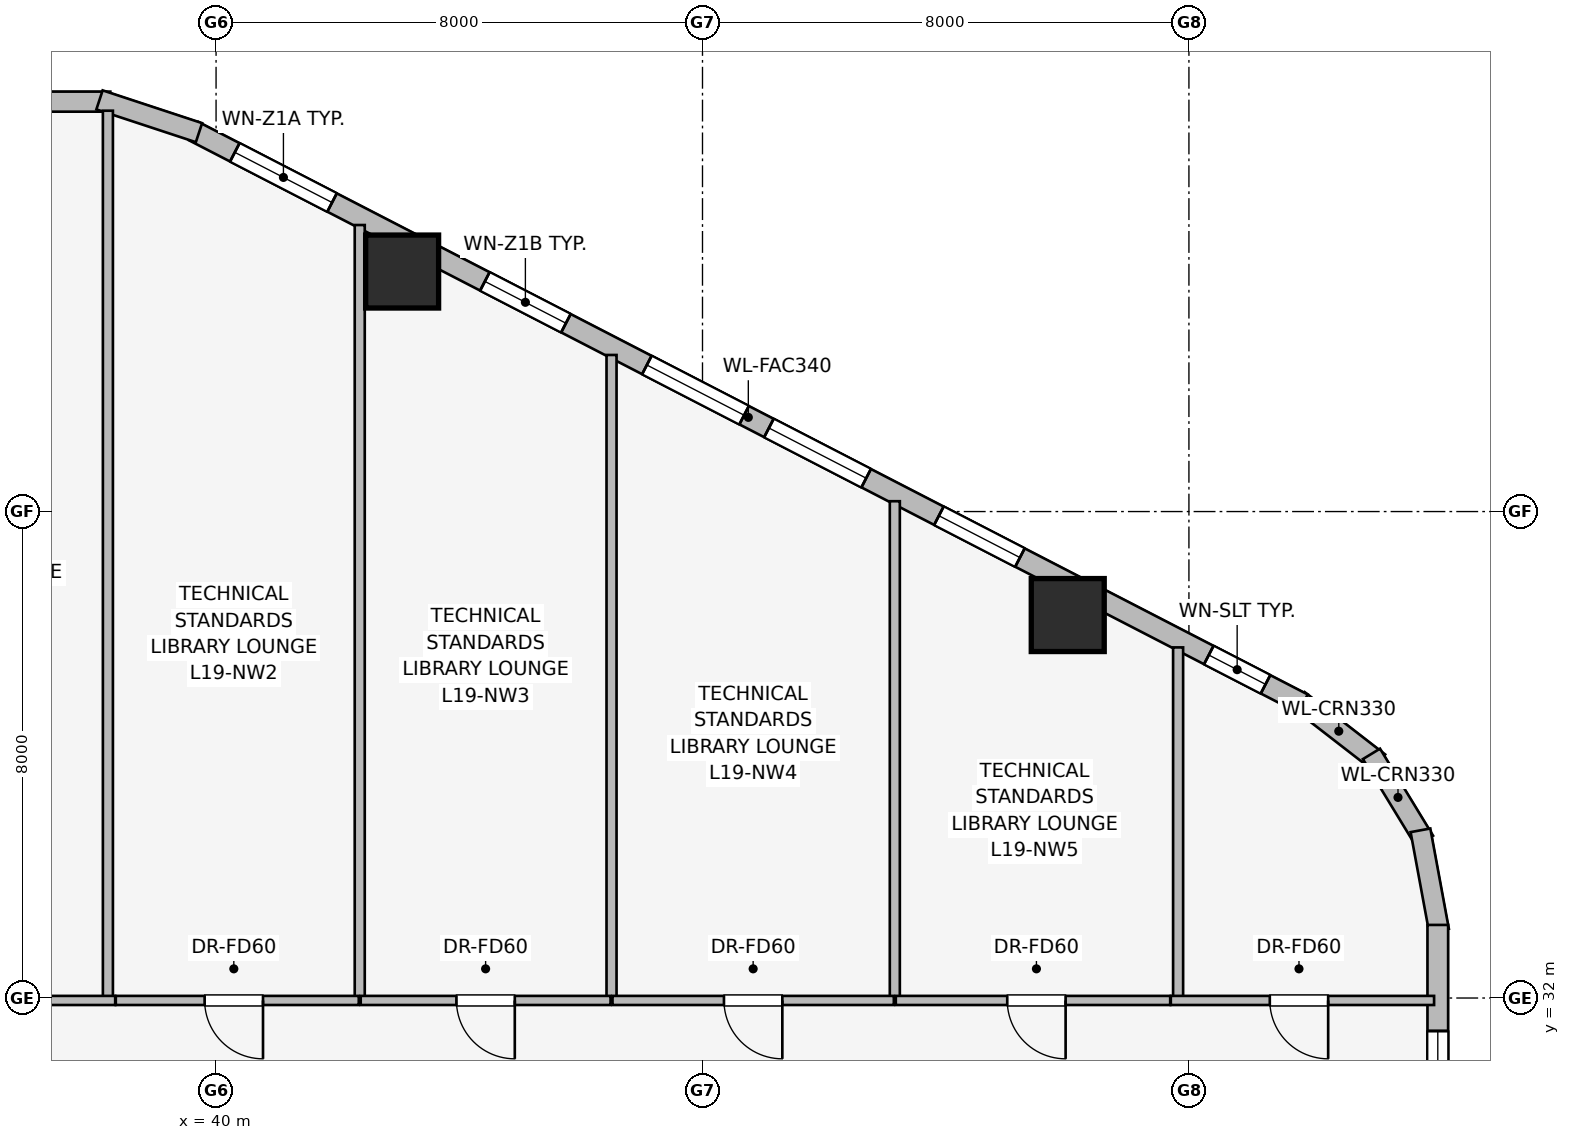
"""IFC4 building model, lengths in metres.
Left out: names, types, materials, properties, quantities, classifications, styles, units other than length and angle.
Written with IfcOpenShell. Run it as: python <this file> out.ifc"""

import sys

from ifc_helpers import new_model, si_unit, direction, frame, frame_2d, origin, origin_2d, place, context, subcontext, project, spatial, rectangle, extrude, element, fill, save


model = new_model("IFC4")
c1 = context("Model", 3, precision=1e-05, world=origin(), true_north=direction((0.0, 1.0)))
c2 = subcontext(c1, "Body", "Model", "MODEL_VIEW")
j1 = project(units=[si_unit("LENGTHUNIT", "METRE"), si_unit("PLANEANGLEUNIT", "RADIAN")], contexts=[c1])
p1 = place(None, origin())
s1 = spatial("IfcSite", under=j1, at=p1, CompositionType="ELEMENT")
p2 = place(p1, origin())
s2 = spatial("IfcBuilding", under=s1, at=p2, CompositionType="ELEMENT")
p3 = place(p2, frame((0.0, 0.0, 74.45)))
s3 = spatial("IfcBuildingStorey", under=s2, at=p3, CompositionType="ELEMENT", Elevation=74.45)
for number, where, z_axis, x_axis in (
    (1, (54.007, 38.298, 0.0), (0.0, 0.0, 1.0), (1.0, 0.0, 0.0)),
    (2, (43.06, 43.947, 0.0), (0.0, 0.0, 1.0), (1.0, 0.0, 0.0)),
):
    element("IfcColumn", number, at=place(p3, frame(where, z_axis=z_axis, x_axis=x_axis)), inside=s3, PredefinedType="COLUMN", context=c2, shape_type="SweptSolid", body=[
        extrude(rectangle(XDim=1.2, YDim=1.2, at=origin_2d()), origin(), (0.0, 0.0, 1.0), 3.65),
    ])
p4 = place(p3, frame((57.802, 36.901, 0.0), z_axis=(0.0, 0.0, 1.0), x_axis=(0.790691856293, -0.61221433207, 0.0)))
e3 = element("IfcWall", 3, at=p4, inside=s3, PredefinedType="STANDARD", context=c2, shape_type="SweptSolid", body=[
    extrude(rectangle(XDim=1.676, YDim=0.33, at=frame_2d((0.838, 0.0))), origin(), (0.0, 0.0, 1.0), 3.39),
])
p5 = place(p3, frame((59.002, 36.015, 0.0), z_axis=(0.0, 0.0, 1.0), x_axis=(0.520584129191, -0.853810379671, 0.0)))
e4 = element("IfcWall", 4, at=p5, inside=s3, PredefinedType="STANDARD", context=c2, shape_type="SweptSolid", body=[
    extrude(rectangle(XDim=1.677, YDim=0.33, at=frame_2d((0.838, 0.0))), origin(), (0.0, 0.0, 1.0), 3.39),
])
p6 = place(p3, frame((59.808, 34.758, 0.0), z_axis=(0.0, 0.0, 1.0), x_axis=(0.181714143354, -0.983351397063, 0.0)))
e5 = element("IfcWall", 5, at=p6, inside=s3, PredefinedType="STANDARD", context=c2, shape_type="SweptSolid", body=[
    extrude(rectangle(XDim=1.678, YDim=0.33, at=frame_2d((0.839, 0.0))), origin(), (0.0, 0.0, 1.0), 3.39),
])
p7 = place(p3, frame((39.631, 46.257, 0.0), z_axis=(0.0, 0.0, 1.0), x_axis=(0.888634413993, -0.458616264721, 0.0)))
e6 = element("IfcWall", 6, at=p7, inside=s3, PredefinedType="STANDARD", context=c2, shape_type="SweptSolid", body=[
    extrude(rectangle(XDim=20.531, YDim=0.34, at=frame_2d((10.266, 0.0))), origin(), (0.0, 0.0, 1.0), 2.684),
])
p8 = place(p7, frame((0.762, 0.0, 0.75)))
e7 = element("IfcOpeningElement", 7, at=p8, cuts=e6, PredefinedType="OPENING", context=c2, shape_type="SweptSolid", body=[
    extrude(rectangle(XDim=1.8, YDim=1.5, at=frame_2d((0.9, 0.75))), frame((0.0, 0.18, 0.0), z_axis=(0.0, -1.0, 0.0), x_axis=(1.0, 0.0, 0.0)), (0.0, 0.0, 1.0), 0.36),
])
p9 = place(p7, frame((5.39, 0.0, 0.75)))
e8 = element("IfcOpeningElement", 8, at=p9, cuts=e6, PredefinedType="OPENING", context=c2, shape_type="SweptSolid", body=[
    extrude(rectangle(XDim=1.5, YDim=1.5, at=frame_2d((0.75, 0.75))), frame((0.0, 0.18, 0.0), z_axis=(0.0, -1.0, 0.0), x_axis=(1.0, 0.0, 0.0)), (0.0, 0.0, 1.0), 0.36),
])
p10 = place(p7, frame((8.388, 0.0, 0.75)))
e9 = element("IfcOpeningElement", 9, at=p10, cuts=e6, PredefinedType="OPENING", context=c2, shape_type="SweptSolid", body=[
    extrude(rectangle(XDim=1.8, YDim=1.5, at=frame_2d((0.9, 0.75))), frame((0.0, 0.18, 0.0), z_axis=(0.0, -1.0, 0.0), x_axis=(1.0, 0.0, 0.0)), (0.0, 0.0, 1.0), 0.36),
])
p11 = place(p7, frame((10.647, 0.0, 0.75)))
e10 = element("IfcOpeningElement", 10, at=p11, cuts=e6, PredefinedType="OPENING", context=c2, shape_type="SweptSolid", body=[
    extrude(rectangle(XDim=1.8, YDim=1.5, at=frame_2d((0.9, 0.75))), frame((0.0, 0.18, 0.0), z_axis=(0.0, -1.0, 0.0), x_axis=(1.0, 0.0, 0.0)), (0.0, 0.0, 1.0), 0.36),
])
p12 = place(p7, frame((13.793, 0.0, 0.75)))
e11 = element("IfcOpeningElement", 11, at=p12, cuts=e6, PredefinedType="OPENING", context=c2, shape_type="SweptSolid", body=[
    extrude(rectangle(XDim=1.5, YDim=1.5, at=frame_2d((0.75, 0.75))), frame((0.0, 0.18, 0.0), z_axis=(0.0, -1.0, 0.0), x_axis=(1.0, 0.0, 0.0)), (0.0, 0.0, 1.0), 0.36),
])
p13 = place(p7, frame((18.788, 0.0, 0.75)))
e12 = element("IfcOpeningElement", 12, at=p13, cuts=e6, PredefinedType="OPENING", context=c2, shape_type="SweptSolid", body=[
    extrude(rectangle(XDim=1.05, YDim=1.4, at=frame_2d((0.525, 0.7))), frame((0.0, 0.18, 0.0), z_axis=(0.0, -1.0, 0.0), x_axis=(1.0, 0.0, 0.0)), (0.0, 0.0, 1.0), 0.36),
])
p14 = place(p3, frame((36.539, 46.741, 0.0), z_axis=(0.0, 0.0, 1.0), x_axis=(1.0, 0.0, 0.0)))
e13 = element("IfcWall", 13, at=p14, inside=s3, PredefinedType="STANDARD", context=c2, shape_type="SweptSolid", body=[
    extrude(rectangle(XDim=1.722, YDim=0.33, at=frame_2d((0.861, 0.0))), origin(), (0.0, 0.0, 1.0), 3.39),
])
p15 = place(p3, frame((38.083, 46.77, 0.0), z_axis=(0.0, 0.0, 1.0), x_axis=(0.94976901097, -0.312951794691, 0.0)))
e14 = element("IfcWall", 14, at=p15, inside=s3, PredefinedType="STANDARD", context=c2, shape_type="SweptSolid", body=[
    extrude(rectangle(XDim=1.722, YDim=0.33, at=frame_2d((0.861, 0.0))), origin(), (0.0, 0.0, 1.0), 3.39),
])
p16 = place(p3, frame((60.093, 33.202, 0.0), z_axis=(0.0, 0.0, 1.0), x_axis=(0.0, -1.0, 0.0)))
e15 = element("IfcWall", 15, at=p16, inside=s3, PredefinedType="STANDARD", context=c2, shape_type="SweptSolid", body=[
    extrude(rectangle(XDim=18.404, YDim=0.34, at=frame_2d((9.202, 0.0))), origin(), (0.0, 0.0, 1.0), 2.684),
])
p17 = place(p16, frame((1.744, 0.0, 0.75)))
e16 = element("IfcOpeningElement", 16, at=p17, cuts=e15, PredefinedType="OPENING", context=c2, shape_type="SweptSolid", body=[
    extrude(rectangle(XDim=1.05, YDim=1.4, at=frame_2d((0.525, 0.7))), frame((0.0, 0.18, 0.0), z_axis=(0.0, -1.0, 0.0), x_axis=(1.0, 0.0, 0.0)), (0.0, 0.0, 1.0), 0.36),
])
p18 = place(p16, frame((5.067, 0.0, 0.75)))
e17 = element("IfcOpeningElement", 17, at=p18, cuts=e15, PredefinedType="OPENING", context=c2, shape_type="SweptSolid", body=[
    extrude(rectangle(XDim=1.5, YDim=1.5, at=frame_2d((0.75, 0.75))), frame((0.0, 0.18, 0.0), z_axis=(0.0, -1.0, 0.0), x_axis=(1.0, 0.0, 0.0)), (0.0, 0.0, 1.0), 0.36),
])
p19 = place(p16, frame((7.858, 0.0, 0.75)))
e18 = element("IfcOpeningElement", 18, at=p19, cuts=e15, PredefinedType="OPENING", context=c2, shape_type="SweptSolid", body=[
    extrude(rectangle(XDim=1.5, YDim=1.5, at=frame_2d((0.75, 0.75))), frame((0.0, 0.18, 0.0), z_axis=(0.0, -1.0, 0.0), x_axis=(1.0, 0.0, 0.0)), (0.0, 0.0, 1.0), 0.36),
])
p20 = place(p16, frame((11.456, 0.0, 0.75)))
e19 = element("IfcOpeningElement", 19, at=p20, cuts=e15, PredefinedType="OPENING", context=c2, shape_type="SweptSolid", body=[
    extrude(rectangle(XDim=1.8, YDim=1.5, at=frame_2d((0.9, 0.75))), frame((0.0, 0.18, 0.0), z_axis=(0.0, -1.0, 0.0), x_axis=(1.0, 0.0, 0.0)), (0.0, 0.0, 1.0), 0.36),
])
p21 = place(p16, frame((15.65, 0.0, 0.75)))
e20 = element("IfcOpeningElement", 20, at=p21, cuts=e15, PredefinedType="OPENING", context=c2, shape_type="SweptSolid", body=[
    extrude(rectangle(XDim=1.05, YDim=1.4, at=frame_2d((0.525, 0.7))), frame((0.0, 0.18, 0.0), z_axis=(0.0, -1.0, 0.0), x_axis=(1.0, 0.0, 0.0)), (0.0, 0.0, 1.0), 0.36),
])
p22 = place(p3, frame((38.221, 31.97, 0.0), z_axis=(0.0, 0.0, 1.0), x_axis=(0.0, 1.0, 0.0)))
e21 = element("IfcWall", 21, at=p22, inside=s3, PredefinedType="PARTITIONING", context=c2, shape_type="SweptSolid", body=[
    extrude(rectangle(XDim=14.622, YDim=0.165, at=frame_2d((7.311, 0.0))), origin(), (0.0, 0.0, 1.0), 3.39),
])
p23 = place(p3, frame((42.363, 31.97, 0.0), z_axis=(0.0, 0.0, 1.0), x_axis=(0.0, 1.0, 0.0)))
e22 = element("IfcWall", 22, at=p23, inside=s3, PredefinedType="PARTITIONING", context=c2, shape_type="SweptSolid", body=[
    extrude(rectangle(XDim=12.742, YDim=0.165, at=frame_2d((6.371, 0.0))), origin(), (0.0, 0.0, 1.0), 2.513),
])
p24 = place(p3, frame((46.504, 31.97, 0.0), z_axis=(0.0, 0.0, 1.0), x_axis=(0.0, 1.0, 0.0)))
e23 = element("IfcWall", 23, at=p24, inside=s3, PredefinedType="PARTITIONING", context=c2, shape_type="SweptSolid", body=[
    extrude(rectangle(XDim=10.605, YDim=0.165, at=frame_2d((5.302, 0.0))), origin(), (0.0, 0.0, 1.0), 3.39),
])
p25 = place(p3, frame((51.163, 31.97, 0.0), z_axis=(0.0, 0.0, 1.0), x_axis=(0.0, 1.0, 0.0)))
e24 = element("IfcWall", 24, at=p25, inside=s3, PredefinedType="PARTITIONING", context=c2, shape_type="SweptSolid", body=[
    extrude(rectangle(XDim=8.2, YDim=0.165, at=frame_2d((4.1, 0.0))), origin(), (0.0, 0.0, 1.0), 3.39),
])
p26 = place(p3, frame((55.822, 31.97, 0.0), z_axis=(0.0, 0.0, 1.0), x_axis=(0.0, 1.0, 0.0)))
e25 = element("IfcWall", 25, at=p26, inside=s3, PredefinedType="PARTITIONING", context=c2, shape_type="SweptSolid", body=[
    extrude(rectangle(XDim=5.796, YDim=0.165, at=frame_2d((2.898, 0.0))), origin(), (0.0, 0.0, 1.0), 3.39),
])
p27 = place(p3, frame((38.341, 31.96, 0.0), z_axis=(0.0, 0.0, 1.0), x_axis=(-1.0, 0.0, 0.0)))
e26 = element("IfcWall", 26, at=p27, inside=s3, PredefinedType="PARTITIONING", context=c2, shape_type="SweptSolid", body=[
    extrude(rectangle(XDim=4.051, YDim=0.15, at=frame_2d((2.025, 0.0))), origin(), (0.0, 0.0, 1.0), 3.39),
])
p28 = place(p27, frame((1.489, 0.0, 0.0)))
e27 = element("IfcOpeningElement", 27, at=p28, cuts=e26, PredefinedType="OPENING", context=c2, shape_type="SweptSolid", body=[
    extrude(rectangle(XDim=0.96, YDim=2.0, at=frame_2d((0.48, 1.0))), frame((0.0, 0.085, 0.0), z_axis=(0.0, -1.0, 0.0), x_axis=(1.0, 0.0, 0.0)), (0.0, 0.0, 1.0), 0.17),
])
p29 = place(p3, frame((42.347, 31.96, 0.0), z_axis=(0.0, 0.0, 1.0), x_axis=(-1.0, 0.0, 0.0)))
e28 = element("IfcWall", 28, at=p29, inside=s3, PredefinedType="PARTITIONING", context=c2, shape_type="SweptSolid", body=[
    extrude(rectangle(XDim=3.996, YDim=0.15, at=frame_2d((1.998, 0.0))), origin(), (0.0, 0.0, 1.0), 3.39),
])
p30 = place(p29, frame((1.575, 0.0, 0.0)))
e29 = element("IfcOpeningElement", 29, at=p30, cuts=e28, PredefinedType="OPENING", context=c2, shape_type="SweptSolid", body=[
    extrude(rectangle(XDim=0.96, YDim=2.0, at=frame_2d((0.48, 1.0))), frame((0.0, 0.085, 0.0), z_axis=(0.0, -1.0, 0.0), x_axis=(1.0, 0.0, 0.0)), (0.0, 0.0, 1.0), 0.17),
])
p31 = place(p3, frame((46.488, 31.96, 0.0), z_axis=(0.0, 0.0, 1.0), x_axis=(-1.0, 0.0, 0.0)))
e30 = element("IfcWall", 30, at=p31, inside=s3, PredefinedType="PARTITIONING", context=c2, shape_type="SweptSolid", body=[
    extrude(rectangle(XDim=4.109, YDim=0.15, at=frame_2d((2.055, 0.0))), origin(), (0.0, 0.0, 1.0), 3.39),
])
p32 = place(p31, frame((1.575, 0.0, 0.0)))
e31 = element("IfcOpeningElement", 31, at=p32, cuts=e30, PredefinedType="OPENING", context=c2, shape_type="SweptSolid", body=[
    extrude(rectangle(XDim=0.96, YDim=2.0, at=frame_2d((0.48, 1.0))), frame((0.0, 0.085, 0.0), z_axis=(0.0, -1.0, 0.0), x_axis=(1.0, 0.0, 0.0)), (0.0, 0.0, 1.0), 0.17),
])
p33 = place(p3, frame((51.147, 31.96, 0.0), z_axis=(0.0, 0.0, 1.0), x_axis=(-1.0, 0.0, 0.0)))
e32 = element("IfcWall", 32, at=p33, inside=s3, PredefinedType="PARTITIONING", context=c2, shape_type="SweptSolid", body=[
    extrude(rectangle(XDim=4.627, YDim=0.15, at=frame_2d((2.313, 0.0))), origin(), (0.0, 0.0, 1.0), 3.39),
])
p34 = place(p33, frame((1.834, 0.0, 0.0)))
e33 = element("IfcOpeningElement", 33, at=p34, cuts=e32, PredefinedType="OPENING", context=c2, shape_type="SweptSolid", body=[
    extrude(rectangle(XDim=0.96, YDim=2.0, at=frame_2d((0.48, 1.0))), frame((0.0, 0.085, 0.0), z_axis=(0.0, -1.0, 0.0), x_axis=(1.0, 0.0, 0.0)), (0.0, 0.0, 1.0), 0.17),
])
p35 = place(p3, frame((55.692, 31.96, 0.0), z_axis=(0.0, 0.0, 1.0), x_axis=(-1.0, 0.0, 0.0)))
e34 = element("IfcWall", 34, at=p35, inside=s3, PredefinedType="PARTITIONING", context=c2, shape_type="SweptSolid", body=[
    extrude(rectangle(XDim=4.513, YDim=0.15, at=frame_2d((2.256, 0.0))), origin(), (0.0, 0.0, 1.0), 3.39),
])
p36 = place(p35, frame((1.72, 0.0, 0.0)))
e35 = element("IfcOpeningElement", 35, at=p36, cuts=e34, PredefinedType="OPENING", context=c2, shape_type="SweptSolid", body=[
    extrude(rectangle(XDim=0.96, YDim=2.0, at=frame_2d((0.48, 1.0))), frame((0.0, 0.085, 0.0), z_axis=(0.0, -1.0, 0.0), x_axis=(1.0, 0.0, 0.0)), (0.0, 0.0, 1.0), 0.17),
])
p37 = place(p3, frame((60.032, 31.96, 0.0), z_axis=(0.0, 0.0, 1.0), x_axis=(-1.0, 0.0, 0.0)))
e36 = element("IfcWall", 36, at=p37, inside=s3, PredefinedType="PARTITIONING", context=c2, shape_type="SweptSolid", body=[
    extrude(rectangle(XDim=4.33, YDim=0.15, at=frame_2d((2.165, 0.0))), origin(), (0.0, 0.0, 1.0), 3.39),
])
p38 = place(p37, frame((1.742, 0.0, 0.0)))
e37 = element("IfcOpeningElement", 37, at=p38, cuts=e36, PredefinedType="OPENING", context=c2, shape_type="SweptSolid", body=[
    extrude(rectangle(XDim=0.96, YDim=2.0, at=frame_2d((0.48, 1.0))), frame((0.0, 0.085, 0.0), z_axis=(0.0, -1.0, 0.0), x_axis=(1.0, 0.0, 0.0)), (0.0, 0.0, 1.0), 0.17),
])
p39 = place(p8, origin())
e38 = element("IfcWindow", 38, at=p39, inside=s3, PartitioningType="SINGLE_PANEL", PredefinedType="WINDOW", context=c2, shape_type="SweptSolid", body=[
    extrude(rectangle(XDim=1.8, YDim=1.5, at=frame_2d((0.9, 0.75))), frame((0.0, 0.03, 0.0), z_axis=(0.0, -1.0, 0.0), x_axis=(1.0, 0.0, 0.0)), (0.0, 0.0, 1.0), 0.06),
])
fill(e7, e38)
p40 = place(p9, origin())
e39 = element("IfcWindow", 39, at=p40, inside=s3, PartitioningType="SINGLE_PANEL", PredefinedType="WINDOW", context=c2, shape_type="SweptSolid", body=[
    extrude(rectangle(XDim=1.5, YDim=1.5, at=frame_2d((0.75, 0.75))), frame((0.0, 0.03, 0.0), z_axis=(0.0, -1.0, 0.0), x_axis=(1.0, 0.0, 0.0)), (0.0, 0.0, 1.0), 0.06),
])
fill(e8, e39)
p41 = place(p10, origin())
e40 = element("IfcWindow", 40, at=p41, inside=s3, PartitioningType="SINGLE_PANEL", PredefinedType="WINDOW", context=c2, shape_type="SweptSolid", body=[
    extrude(rectangle(XDim=1.8, YDim=1.5, at=frame_2d((0.9, 0.75))), frame((0.0, 0.03, 0.0), z_axis=(0.0, -1.0, 0.0), x_axis=(1.0, 0.0, 0.0)), (0.0, 0.0, 1.0), 0.06),
])
fill(e9, e40)
p42 = place(p11, origin())
e41 = element("IfcWindow", 41, at=p42, inside=s3, PartitioningType="SINGLE_PANEL", PredefinedType="WINDOW", context=c2, shape_type="SweptSolid", body=[
    extrude(rectangle(XDim=1.8, YDim=1.5, at=frame_2d((0.9, 0.75))), frame((0.0, 0.03, 0.0), z_axis=(0.0, -1.0, 0.0), x_axis=(1.0, 0.0, 0.0)), (0.0, 0.0, 1.0), 0.06),
])
fill(e10, e41)
p43 = place(p12, origin())
e42 = element("IfcWindow", 42, at=p43, inside=s3, PartitioningType="SINGLE_PANEL", PredefinedType="WINDOW", context=c2, shape_type="SweptSolid", body=[
    extrude(rectangle(XDim=1.5, YDim=1.5, at=frame_2d((0.75, 0.75))), frame((0.0, 0.03, 0.0), z_axis=(0.0, -1.0, 0.0), x_axis=(1.0, 0.0, 0.0)), (0.0, 0.0, 1.0), 0.06),
])
fill(e11, e42)
p44 = place(p13, origin())
e43 = element("IfcWindow", 43, at=p44, inside=s3, PartitioningType="SINGLE_PANEL", PredefinedType="WINDOW", context=c2, shape_type="SweptSolid", body=[
    extrude(rectangle(XDim=1.05, YDim=1.4, at=frame_2d((0.525, 0.7))), frame((0.0, 0.03, 0.0), z_axis=(0.0, -1.0, 0.0), x_axis=(1.0, 0.0, 0.0)), (0.0, 0.0, 1.0), 0.06),
])
fill(e12, e43)
p45 = place(p17, origin())
e44 = element("IfcWindow", 44, at=p45, inside=s3, PartitioningType="SINGLE_PANEL", PredefinedType="WINDOW", context=c2, shape_type="SweptSolid", body=[
    extrude(rectangle(XDim=1.05, YDim=1.4, at=frame_2d((0.525, 0.7))), frame((0.0, 0.03, 0.0), z_axis=(0.0, -1.0, 0.0), x_axis=(1.0, 0.0, 0.0)), (0.0, 0.0, 1.0), 0.06),
])
fill(e16, e44)
p46 = place(p30, origin())
e45 = element("IfcDoor", 45, at=p46, inside=s3, OperationType="SINGLE_SWING_LEFT", PredefinedType="DOOR", context=c2, shape_type="SweptSolid", body=[
    extrude(rectangle(XDim=0.96, YDim=2.0, at=frame_2d((0.48, 1.0))), frame((0.0, 0.025, 0.0), z_axis=(0.0, -1.0, 0.0), x_axis=(1.0, 0.0, 0.0)), (0.0, 0.0, 1.0), 0.05),
])
fill(e29, e45)
p47 = place(p32, origin())
e46 = element("IfcDoor", 46, at=p47, inside=s3, OperationType="SINGLE_SWING_LEFT", PredefinedType="DOOR", context=c2, shape_type="SweptSolid", body=[
    extrude(rectangle(XDim=0.96, YDim=2.0, at=frame_2d((0.48, 1.0))), frame((0.0, 0.025, 0.0), z_axis=(0.0, -1.0, 0.0), x_axis=(1.0, 0.0, 0.0)), (0.0, 0.0, 1.0), 0.05),
])
fill(e31, e46)
p48 = place(p34, origin())
e47 = element("IfcDoor", 47, at=p48, inside=s3, OperationType="SINGLE_SWING_LEFT", PredefinedType="DOOR", context=c2, shape_type="SweptSolid", body=[
    extrude(rectangle(XDim=0.96, YDim=2.0, at=frame_2d((0.48, 1.0))), frame((0.0, 0.025, 0.0), z_axis=(0.0, -1.0, 0.0), x_axis=(1.0, 0.0, 0.0)), (0.0, 0.0, 1.0), 0.05),
])
fill(e33, e47)
p49 = place(p36, origin())
e48 = element("IfcDoor", 48, at=p49, inside=s3, OperationType="SINGLE_SWING_LEFT", PredefinedType="DOOR", context=c2, shape_type="SweptSolid", body=[
    extrude(rectangle(XDim=0.96, YDim=2.0, at=frame_2d((0.48, 1.0))), frame((0.0, 0.025, 0.0), z_axis=(0.0, -1.0, 0.0), x_axis=(1.0, 0.0, 0.0)), (0.0, 0.0, 1.0), 0.05),
])
fill(e35, e48)
p50 = place(p38, origin())
e49 = element("IfcDoor", 49, at=p50, inside=s3, OperationType="SINGLE_SWING_LEFT", PredefinedType="DOOR", context=c2, shape_type="SweptSolid", body=[
    extrude(rectangle(XDim=0.96, YDim=2.0, at=frame_2d((0.48, 1.0))), frame((0.0, 0.025, 0.0), z_axis=(0.0, -1.0, 0.0), x_axis=(1.0, 0.0, 0.0)), (0.0, 0.0, 1.0), 0.05),
])
fill(e37, e49)
save(model, sys.argv[1])
